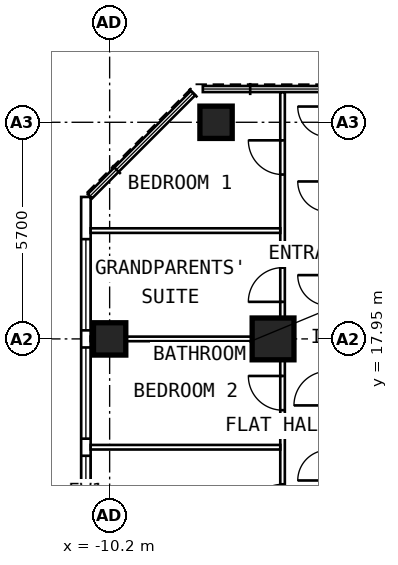
"""IFC4 building model, lengths in metres.
Left out: names, types, materials, properties, quantities, classifications, styles, units other than length and angle.
Written with IfcOpenShell. Run it as: python <this file> out.ifc"""

import sys

from ifc_helpers import new_model, si_unit, direction, frame, frame_2d, origin, origin_2d, place, context, subcontext, project, spatial, rectangle, extrude, element, fill, save


model = new_model("IFC4")
c1 = context("Model", 3, precision=1e-05, world=origin(), true_north=direction((0.0, 1.0)))
c2 = subcontext(c1, "Body", "Model", "MODEL_VIEW")
j1 = project(units=[si_unit("LENGTHUNIT", "METRE"), si_unit("PLANEANGLEUNIT", "RADIAN")], contexts=[c1])
p1 = place(None, origin())
s1 = spatial("IfcSite", under=j1, at=p1, CompositionType="ELEMENT")
p2 = place(p1, origin())
s2 = spatial("IfcBuilding", under=s1, at=p2, CompositionType="ELEMENT")
p3 = place(p2, frame((0.0, 0.0, 242.4)))
s3 = spatial("IfcBuildingStorey", under=s2, at=p3, CompositionType="ELEMENT", Elevation=242.4)
for number, where, z_axis, x_axis in (
    (1, (-10.2, 17.95, 0.0), (0.0, 0.0, 1.0), (0.0, 1.0, 0.0)),
    (2, (-7.4, 23.65, 0.0), (0.0, 0.0, 1.0), (0.0, 1.0, 0.0)),
):
    element("IfcColumn", number, at=place(p3, frame(where, z_axis=z_axis, x_axis=x_axis)), inside=s3, PredefinedType="COLUMN", context=c2, shape_type="SweptSolid", body=[
        extrude(rectangle(XDim=0.85, YDim=0.85, at=origin_2d()), origin(), (0.0, 0.0, 1.0), 3.6),
    ])
p4 = place(p3, frame((-5.9, 17.95, 0.0), z_axis=(0.0, 0.0, 1.0), x_axis=(0.0, 1.0, 0.0)))
e3 = element("IfcColumn", 3, at=p4, inside=s3, PredefinedType="COLUMN", context=c2, shape_type="SweptSolid", body=[
    extrude(rectangle(XDim=1.1, YDim=1.1, at=origin_2d()), origin(), (0.0, 0.0, 1.0), 3.6),
])
p5 = place(p3, frame((-10.825, 6.148, 0.0), z_axis=(0.0, 0.0, 1.0), x_axis=(0.0, 1.0, 0.0)))
e4 = element("IfcWall", 4, at=p5, inside=s3, PredefinedType="SOLIDWALL", context=c2, shape_type="SweptSolid", body=[
    extrude(rectangle(XDim=15.537, YDim=0.25, at=frame_2d((7.769, 0.0))), origin(), (0.0, 0.0, 1.0), 3.35),
])
p6 = place(p5, frame((0.627, 0.0, 0.8)))
e5 = element("IfcOpeningElement", 5, at=p6, cuts=e4, PredefinedType="OPENING", context=c2, shape_type="SweptSolid", body=[
    extrude(rectangle(XDim=2.4, YDim=1.8, at=frame_2d((1.2, 0.9))), frame((0.0, 0.137, 0.0), z_axis=(0.0, -1.0, 0.0), x_axis=(1.0, 0.0, 0.0)), (0.0, 0.0, 1.0), 0.274),
])
p7 = place(p5, frame((3.477, 0.0, 0.8)))
e6 = element("IfcOpeningElement", 6, at=p7, cuts=e4, PredefinedType="OPENING", context=c2, shape_type="SweptSolid", body=[
    extrude(rectangle(XDim=2.4, YDim=1.8, at=frame_2d((1.2, 0.9))), frame((0.0, 0.137, 0.0), z_axis=(0.0, -1.0, 0.0), x_axis=(1.0, 0.0, 0.0)), (0.0, 0.0, 1.0), 0.274),
])
p8 = place(p5, frame((6.327, 0.0, 0.8)))
e7 = element("IfcOpeningElement", 7, at=p8, cuts=e4, PredefinedType="OPENING", context=c2, shape_type="SweptSolid", body=[
    extrude(rectangle(XDim=2.4, YDim=1.8, at=frame_2d((1.2, 0.9))), frame((0.0, 0.137, 0.0), z_axis=(0.0, -1.0, 0.0), x_axis=(1.0, 0.0, 0.0)), (0.0, 0.0, 1.0), 0.274),
])
p9 = place(p5, frame((9.177, 0.0, 0.8)))
e8 = element("IfcOpeningElement", 8, at=p9, cuts=e4, PredefinedType="OPENING", context=c2, shape_type="SweptSolid", body=[
    extrude(rectangle(XDim=2.4, YDim=1.8, at=frame_2d((1.2, 0.9))), frame((0.0, 0.137, 0.0), z_axis=(0.0, -1.0, 0.0), x_axis=(1.0, 0.0, 0.0)), (0.0, 0.0, 1.0), 0.274),
])
p10 = place(p5, frame((12.027, 0.0, 0.8)))
e9 = element("IfcOpeningElement", 9, at=p10, cuts=e4, PredefinedType="OPENING", context=c2, shape_type="SweptSolid", body=[
    extrude(rectangle(XDim=2.4, YDim=1.8, at=frame_2d((1.2, 0.9))), frame((0.0, 0.137, 0.0), z_axis=(0.0, -1.0, 0.0), x_axis=(1.0, 0.0, 0.0)), (0.0, 0.0, 1.0), 0.274),
])
p11 = place(p3, frame((-5.65, 9.6, 0.0), z_axis=(0.0, 0.0, 1.0), x_axis=(0.0, 1.0, 0.0)))
e10 = element("IfcWall", 10, at=p11, inside=s3, PredefinedType="PARTITIONING", context=c2, shape_type="SweptSolid", body=[
    extrude(rectangle(XDim=14.845, YDim=0.12, at=frame_2d((7.422, 0.0))), origin(), (0.0, 0.0, 1.0), 3.35),
])
p12 = place(p11, frame((1.05, 0.0, 0.0)))
e11 = element("IfcOpeningElement", 11, at=p12, cuts=e10, PredefinedType="OPENING", context=c2, shape_type="SweptSolid", body=[
    extrude(rectangle(XDim=0.9, YDim=2.1, at=frame_2d((0.45, 1.05))), frame((0.0, 0.072, 0.0), z_axis=(0.0, -1.0, 0.0), x_axis=(1.0, 0.0, 0.0)), (0.0, 0.0, 1.0), 0.144),
])
p13 = place(p11, frame((3.625, 0.0, 0.0)))
e12 = element("IfcOpeningElement", 12, at=p13, cuts=e10, PredefinedType="OPENING", context=c2, shape_type="SweptSolid", body=[
    extrude(rectangle(XDim=0.9, YDim=2.1, at=frame_2d((0.45, 1.05))), frame((0.0, 0.072, 0.0), z_axis=(0.0, -1.0, 0.0), x_axis=(1.0, 0.0, 0.0)), (0.0, 0.0, 1.0), 0.144),
])
p14 = place(p11, frame((6.475, 0.0, 0.0)))
e13 = element("IfcOpeningElement", 13, at=p14, cuts=e10, PredefinedType="OPENING", context=c2, shape_type="SweptSolid", body=[
    extrude(rectangle(XDim=0.9, YDim=2.1, at=frame_2d((0.45, 1.05))), frame((0.0, 0.072, 0.0), z_axis=(0.0, -1.0, 0.0), x_axis=(1.0, 0.0, 0.0)), (0.0, 0.0, 1.0), 0.144),
])
p15 = place(p11, frame((9.325, 0.0, 0.0)))
e14 = element("IfcOpeningElement", 14, at=p15, cuts=e10, PredefinedType="OPENING", context=c2, shape_type="SweptSolid", body=[
    extrude(rectangle(XDim=0.9, YDim=2.1, at=frame_2d((0.45, 1.05))), frame((0.0, 0.072, 0.0), z_axis=(0.0, -1.0, 0.0), x_axis=(1.0, 0.0, 0.0)), (0.0, 0.0, 1.0), 0.144),
])
p16 = place(p11, frame((12.675, 0.0, 0.0)))
e15 = element("IfcOpeningElement", 15, at=p16, cuts=e10, PredefinedType="OPENING", context=c2, shape_type="SweptSolid", body=[
    extrude(rectangle(XDim=0.9, YDim=2.1, at=frame_2d((0.45, 1.05))), frame((0.0, 0.072, 0.0), z_axis=(0.0, -1.0, 0.0), x_axis=(1.0, 0.0, 0.0)), (0.0, 0.0, 1.0), 0.144),
])
p17 = place(p3, frame((-5.71, 15.1, 0.0), z_axis=(0.0, 0.0, 1.0), x_axis=(-1.0, 0.0, 0.0)))
e16 = element("IfcWall", 16, at=p17, inside=s3, PredefinedType="PARTITIONING", context=c2, shape_type="SweptSolid", body=[
    extrude(rectangle(XDim=4.99, YDim=0.12, at=frame_2d((2.495, 0.0))), origin(), (0.0, 0.0, 1.0), 3.35),
])
p18 = place(p3, frame((-5.71, 17.95, 0.0), z_axis=(0.0, 0.0, 1.0), x_axis=(-1.0, 0.0, 0.0)))
e17 = element("IfcWall", 17, at=p18, inside=s3, PredefinedType="PARTITIONING", context=c2, shape_type="SweptSolid", body=[
    extrude(rectangle(XDim=4.99, YDim=0.12, at=frame_2d((2.495, 0.0))), origin(), (0.0, 0.0, 1.0), 2.45),
])
p19 = place(p3, frame((-5.71, 20.8, 0.0), z_axis=(0.0, 0.0, 1.0), x_axis=(-1.0, 0.0, 0.0)))
e18 = element("IfcWall", 18, at=p19, inside=s3, PredefinedType="PARTITIONING", context=c2, shape_type="SweptSolid", body=[
    extrude(rectangle(XDim=4.99, YDim=0.12, at=frame_2d((2.495, 0.0))), origin(), (0.0, 0.0, 1.0), 3.35),
])
p20 = place(p8, origin())
e19 = element("IfcWindow", 19, at=p20, inside=s3, PartitioningType="SINGLE_PANEL", PredefinedType="WINDOW", context=c2, shape_type="SweptSolid", body=[
    extrude(rectangle(XDim=2.4, YDim=1.8, at=frame_2d((1.2, 0.9))), frame((0.0, 0.03, 0.0), z_axis=(0.0, -1.0, 0.0), x_axis=(1.0, 0.0, 0.0)), (0.0, 0.0, 1.0), 0.06),
])
fill(e7, e19)
p21 = place(p9, origin())
e20 = element("IfcWindow", 20, at=p21, inside=s3, PartitioningType="SINGLE_PANEL", PredefinedType="WINDOW", context=c2, shape_type="SweptSolid", body=[
    extrude(rectangle(XDim=2.4, YDim=1.8, at=frame_2d((1.2, 0.9))), frame((0.0, 0.03, 0.0), z_axis=(0.0, -1.0, 0.0), x_axis=(1.0, 0.0, 0.0)), (0.0, 0.0, 1.0), 0.06),
])
fill(e8, e20)
p22 = place(p10, origin())
e21 = element("IfcWindow", 21, at=p22, inside=s3, PartitioningType="SINGLE_PANEL", PredefinedType="WINDOW", context=c2, shape_type="SweptSolid", body=[
    extrude(rectangle(XDim=2.4, YDim=1.8, at=frame_2d((1.2, 0.9))), frame((0.0, 0.03, 0.0), z_axis=(0.0, -1.0, 0.0), x_axis=(1.0, 0.0, 0.0)), (0.0, 0.0, 1.0), 0.06),
])
fill(e9, e21)
p23 = place(p13, origin())
e22 = element("IfcDoor", 22, at=p23, inside=s3, OperationType="SINGLE_SWING_LEFT", PredefinedType="DOOR", context=c2, shape_type="SweptSolid", body=[
    extrude(rectangle(XDim=0.9, YDim=2.1, at=frame_2d((0.45, 1.05))), frame((0.0, 0.025, 0.0), z_axis=(0.0, -1.0, 0.0), x_axis=(1.0, 0.0, 0.0)), (0.0, 0.0, 1.0), 0.05),
])
fill(e12, e22)
p24 = place(p14, origin())
e23 = element("IfcDoor", 23, at=p24, inside=s3, OperationType="SINGLE_SWING_RIGHT", PredefinedType="DOOR", context=c2, shape_type="SweptSolid", body=[
    extrude(rectangle(XDim=0.9, YDim=2.1, at=frame_2d((0.45, 1.05))), frame((0.0, 0.025, 0.0), z_axis=(0.0, -1.0, 0.0), x_axis=(1.0, 0.0, 0.0)), (0.0, 0.0, 1.0), 0.05),
])
fill(e13, e23)
p25 = place(p15, origin())
e24 = element("IfcDoor", 24, at=p25, inside=s3, OperationType="SINGLE_SWING_LEFT", PredefinedType="DOOR", context=c2, shape_type="SweptSolid", body=[
    extrude(rectangle(XDim=0.9, YDim=2.1, at=frame_2d((0.45, 1.05))), frame((0.0, 0.025, 0.0), z_axis=(0.0, -1.0, 0.0), x_axis=(1.0, 0.0, 0.0)), (0.0, 0.0, 1.0), 0.05),
])
fill(e14, e24)
p26 = place(p16, origin())
e25 = element("IfcDoor", 25, at=p26, inside=s3, OperationType="SINGLE_SWING_RIGHT", PredefinedType="DOOR", context=c2, shape_type="SweptSolid", body=[
    extrude(rectangle(XDim=0.9, YDim=2.1, at=frame_2d((0.45, 1.05))), frame((0.0, 0.025, 0.0), z_axis=(0.0, -1.0, 0.0), x_axis=(1.0, 0.0, 0.0)), (0.0, 0.0, 1.0), 0.05),
])
fill(e15, e25)
save(model, sys.argv[1])
